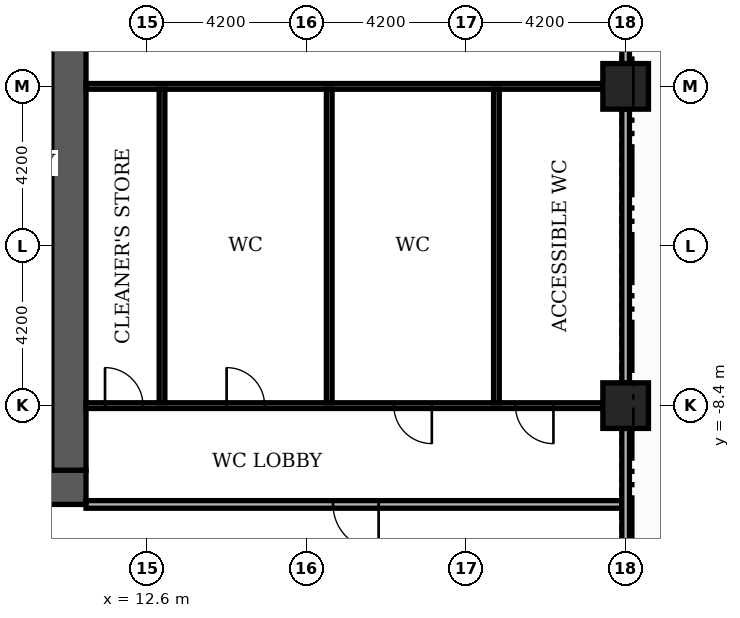
"""IFC4 building model, lengths in metres.
Left out: names, types, materials, properties, quantities, classifications, styles, units other than length and angle.
Written with IfcOpenShell. Run it as: python <this file> out.ifc"""

import sys

from ifc_helpers import new_model, si_unit, direction, frame, frame_2d, origin, origin_2d, place, context, subcontext, project, spatial, rectangle, extrude, element, fill, save


model = new_model("IFC4")
c1 = context("Model", 3, precision=1e-05, world=origin(), true_north=direction((0.0, 1.0)))
c2 = subcontext(c1, "Body", "Model", "MODEL_VIEW")
j1 = project(units=[si_unit("LENGTHUNIT", "METRE"), si_unit("PLANEANGLEUNIT", "RADIAN")], contexts=[c1])
p1 = place(None, origin())
s1 = spatial("IfcSite", under=j1, at=p1, CompositionType="ELEMENT")
p2 = place(p1, origin())
s2 = spatial("IfcBuilding", under=s1, at=p2, CompositionType="ELEMENT")
p3 = place(p2, frame((0.0, 0.0, 7.2)))
s3 = spatial("IfcBuildingStorey", under=s2, at=p3, CompositionType="ELEMENT", Elevation=7.2)
p4 = place(p3, frame((9.2, -3.0, 0.0), z_axis=(0.0, 0.0, 1.0), x_axis=(1.0, 0.0, 0.0)))
e1 = element("IfcWall", 1, at=p4, inside=s3, PredefinedType="SHEAR", context=c2, shape_type="SweptSolid", body=[
    extrude(rectangle(XDim=0.9, YDim=0.2, at=frame_2d((0.45, 0.0))), origin(), (0.0, 0.0, 1.0), 4.38),
])
p5 = place(p3, frame((-11.0, -10.55, 0.0), z_axis=(0.0, 0.0, 1.0), x_axis=(1.0, 0.0, 0.0)))
e2 = element("IfcWall", 2, at=p5, inside=s3, PredefinedType="SHEAR", context=c2, shape_type="SweptSolid", body=[
    extrude(rectangle(XDim=22.0, YDim=0.9, at=frame_2d((11.0, 0.0))), origin(), (0.0, 0.0, 1.0), 4.38),
])
p6 = place(p5, frame((7.4, 0.0, 0.0)))
e3 = element("IfcOpeningElement", 3, at=p6, cuts=e2, PredefinedType="OPENING", context=c2, shape_type="SweptSolid", body=[
    extrude(rectangle(XDim=1.8, YDim=2.2, at=frame_2d((0.9, 1.1))), frame((0.0, 0.46, 0.0), z_axis=(0.0, -1.0, 0.0), x_axis=(1.0, 0.0, 0.0)), (0.0, 0.0, 1.0), 0.92),
])
p7 = place(p3, frame((10.55, -10.1, 0.0), z_axis=(0.0, 0.0, 1.0), x_axis=(0.0, 1.0, 0.0)))
e4 = element("IfcWall", 4, at=p7, inside=s3, PredefinedType="SHEAR", context=c2, shape_type="SweptSolid", body=[
    extrude(rectangle(XDim=20.2, YDim=0.9, at=frame_2d((10.1, 0.0))), origin(), (0.0, 0.0, 1.0), 4.38),
])
for number, where, z_axis, x_axis in (
    (5, (25.2, 0.0, 0.0), (0.0, 0.0, 1.0), (1.0, 0.0, 0.0)),
    (6, (25.2, -8.4, 0.0), (0.0, 0.0, 1.0), (1.0, 0.0, 0.0)),
):
    element("IfcColumn", number, at=place(p3, frame(where, z_axis=z_axis, x_axis=x_axis)), inside=s3, PredefinedType="COLUMN", context=c2, shape_type="SweptSolid", body=[
        extrude(rectangle(XDim=1.2, YDim=1.2, at=origin_2d()), origin(), (0.0, 0.0, 1.0), 4.8),
    ])
p8 = place(p3, frame((11.0, -11.0, 0.0), z_axis=(0.0, 0.0, 1.0), x_axis=(1.0, 0.0, 0.0)))
e7 = element("IfcWall", 7, at=p8, inside=s3, PredefinedType="PARTITIONING", context=c2, shape_type="SweptSolid", body=[
    extrude(rectangle(XDim=14.1, YDim=0.2, at=frame_2d((7.05, 0.0))), origin(), (0.0, 0.0, 1.0), 4.38),
])
p9 = place(p8, frame((6.5, 0.0, 0.0)))
e8 = element("IfcOpeningElement", 8, at=p9, cuts=e7, PredefinedType="OPENING", context=c2, shape_type="SweptSolid", body=[
    extrude(rectangle(XDim=1.2, YDim=2.2, at=frame_2d((0.6, 1.1))), frame((0.0, 0.11, 0.0), z_axis=(0.0, -1.0, 0.0), x_axis=(1.0, 0.0, 0.0)), (0.0, 0.0, 1.0), 0.22),
])
p10 = place(p3, frame((11.0, -8.4, 0.0), z_axis=(0.0, 0.0, 1.0), x_axis=(1.0, 0.0, 0.0)))
e9 = element("IfcWall", 9, at=p10, inside=s3, PredefinedType="PARTITIONING", context=c2, shape_type="SweptSolid", body=[
    extrude(rectangle(XDim=13.6, YDim=0.15, at=frame_2d((6.8, 0.0))), origin(), (0.0, 0.0, 1.0), 4.38),
])
p11 = place(p10, frame((0.5, 0.0, 0.0)))
e10 = element("IfcOpeningElement", 10, at=p11, cuts=e9, PredefinedType="OPENING", context=c2, shape_type="SweptSolid", body=[
    extrude(rectangle(XDim=1.0, YDim=2.1, at=frame_2d((0.5, 1.05))), frame((0.0, 0.085, 0.0), z_axis=(0.0, -1.0, 0.0), x_axis=(1.0, 0.0, 0.0)), (0.0, 0.0, 1.0), 0.17),
])
p12 = place(p10, frame((3.7, 0.0, 0.0)))
e11 = element("IfcOpeningElement", 11, at=p12, cuts=e9, PredefinedType="OPENING", context=c2, shape_type="SweptSolid", body=[
    extrude(rectangle(XDim=1.0, YDim=2.1, at=frame_2d((0.5, 1.05))), frame((0.0, 0.085, 0.0), z_axis=(0.0, -1.0, 0.0), x_axis=(1.0, 0.0, 0.0)), (0.0, 0.0, 1.0), 0.17),
])
p13 = place(p10, frame((8.1, 0.0, 0.0)))
e12 = element("IfcOpeningElement", 12, at=p13, cuts=e9, PredefinedType="OPENING", context=c2, shape_type="SweptSolid", body=[
    extrude(rectangle(XDim=1.0, YDim=2.1, at=frame_2d((0.5, 1.05))), frame((0.0, 0.085, 0.0), z_axis=(0.0, -1.0, 0.0), x_axis=(1.0, 0.0, 0.0)), (0.0, 0.0, 1.0), 0.17),
])
p14 = place(p10, frame((11.3, 0.0, 0.0)))
e13 = element("IfcOpeningElement", 13, at=p14, cuts=e9, PredefinedType="OPENING", context=c2, shape_type="SweptSolid", body=[
    extrude(rectangle(XDim=1.0, YDim=2.1, at=frame_2d((0.5, 1.05))), frame((0.0, 0.085, 0.0), z_axis=(0.0, -1.0, 0.0), x_axis=(1.0, 0.0, 0.0)), (0.0, 0.0, 1.0), 0.17),
])
p15 = place(p3, frame((11.0, 0.0, 0.0), z_axis=(0.0, 0.0, 1.0), x_axis=(1.0, 0.0, 0.0)))
e14 = element("IfcWall", 14, at=p15, inside=s3, PredefinedType="PARTITIONING", context=c2, shape_type="SweptSolid", body=[
    extrude(rectangle(XDim=13.6, YDim=0.15, at=frame_2d((6.8, 0.0))), origin(), (0.0, 0.0, 1.0), 4.38),
])
for number, where, z_axis, x_axis in (
    (15, (13.0, -8.325, 0.0), (0.0, 0.0, 1.0), (0.0, 1.0, 0.0)),
    (16, (17.4, -8.325, 0.0), (0.0, 0.0, 1.0), (0.0, 1.0, 0.0)),
    (17, (21.8, -8.325, 0.0), (0.0, 0.0, 1.0), (0.0, 1.0, 0.0)),
):
    element("IfcWall", number, at=place(p3, frame(where, z_axis=z_axis, x_axis=x_axis)), inside=s3, PredefinedType="PARTITIONING", context=c2, shape_type="SweptSolid", body=[
        extrude(rectangle(XDim=8.25, YDim=0.15, at=frame_2d((4.125, 0.0))), origin(), (0.0, 0.0, 1.0), 4.38),
    ])
p16 = place(p3, frame((25.2, -16.2, 0.0), z_axis=(0.0, 0.0, 1.0), x_axis=(0.0, 1.0, 0.0)))
e18 = element("IfcWall", 18, at=p16, inside=s3, PredefinedType="PARTITIONING", context=c2, shape_type="SweptSolid", body=[
    extrude(rectangle(XDim=7.2, YDim=0.2, at=frame_2d((3.6, 0.0))), origin(), (0.0, 0.0, 1.0), 4.08),
])
p17 = place(p16, frame((1.5, 0.0, 0.0)))
e19 = element("IfcOpeningElement", 19, at=p17, cuts=e18, PredefinedType="OPENING", context=c2, shape_type="SweptSolid", body=[
    extrude(rectangle(XDim=1.8, YDim=2.2, at=frame_2d((0.9, 1.1))), frame((0.0, 0.11, 0.0), z_axis=(0.0, -1.0, 0.0), x_axis=(1.0, 0.0, 0.0)), (0.0, 0.0, 1.0), 0.22),
])
for number, where, z_axis, x_axis in (
    (20, (25.2, -7.8, 0.0), (0.0, 0.0, 1.0), (0.0, 1.0, 0.0)),
    (21, (25.2, 0.6, 0.0), (0.0, 0.0, 1.0), (0.0, 1.0, 0.0)),
):
    element("IfcWall", number, at=place(p3, frame(where, z_axis=z_axis, x_axis=x_axis)), inside=s3, PredefinedType="PARTITIONING", context=c2, shape_type="SweptSolid", body=[
        extrude(rectangle(XDim=7.2, YDim=0.2, at=frame_2d((3.6, 0.0))), origin(), (0.0, 0.0, 1.0), 4.08),
    ])
p18 = place(p9, origin())
e22 = element("IfcDoor", 22, at=p18, inside=s3, OperationType="SINGLE_SWING_RIGHT", PredefinedType="DOOR", context=c2, shape_type="SweptSolid", body=[
    extrude(rectangle(XDim=1.2, YDim=2.2, at=frame_2d((0.6, 1.1))), frame((0.0, 0.025, 0.0), z_axis=(0.0, -1.0, 0.0), x_axis=(1.0, 0.0, 0.0)), (0.0, 0.0, 1.0), 0.05),
])
fill(e8, e22)
p19 = place(p11, origin())
e23 = element("IfcDoor", 23, at=p19, inside=s3, OperationType="SINGLE_SWING_LEFT", PredefinedType="DOOR", context=c2, shape_type="SweptSolid", body=[
    extrude(rectangle(XDim=1.0, YDim=2.1, at=frame_2d((0.5, 1.05))), frame((0.0, 0.025, 0.0), z_axis=(0.0, -1.0, 0.0), x_axis=(1.0, 0.0, 0.0)), (0.0, 0.0, 1.0), 0.05),
])
fill(e10, e23)
p20 = place(p12, origin())
e24 = element("IfcDoor", 24, at=p20, inside=s3, OperationType="SINGLE_SWING_LEFT", PredefinedType="DOOR", context=c2, shape_type="SweptSolid", body=[
    extrude(rectangle(XDim=1.0, YDim=2.1, at=frame_2d((0.5, 1.05))), frame((0.0, 0.025, 0.0), z_axis=(0.0, -1.0, 0.0), x_axis=(1.0, 0.0, 0.0)), (0.0, 0.0, 1.0), 0.05),
])
fill(e11, e24)
p21 = place(p13, origin())
e25 = element("IfcDoor", 25, at=p21, inside=s3, OperationType="SINGLE_SWING_RIGHT", PredefinedType="DOOR", context=c2, shape_type="SweptSolid", body=[
    extrude(rectangle(XDim=1.0, YDim=2.1, at=frame_2d((0.5, 1.05))), frame((0.0, 0.025, 0.0), z_axis=(0.0, -1.0, 0.0), x_axis=(1.0, 0.0, 0.0)), (0.0, 0.0, 1.0), 0.05),
])
fill(e12, e25)
p22 = place(p14, origin())
e26 = element("IfcDoor", 26, at=p22, inside=s3, OperationType="SINGLE_SWING_RIGHT", PredefinedType="DOOR", context=c2, shape_type="SweptSolid", body=[
    extrude(rectangle(XDim=1.0, YDim=2.1, at=frame_2d((0.5, 1.05))), frame((0.0, 0.025, 0.0), z_axis=(0.0, -1.0, 0.0), x_axis=(1.0, 0.0, 0.0)), (0.0, 0.0, 1.0), 0.05),
])
fill(e13, e26)
save(model, sys.argv[1])
